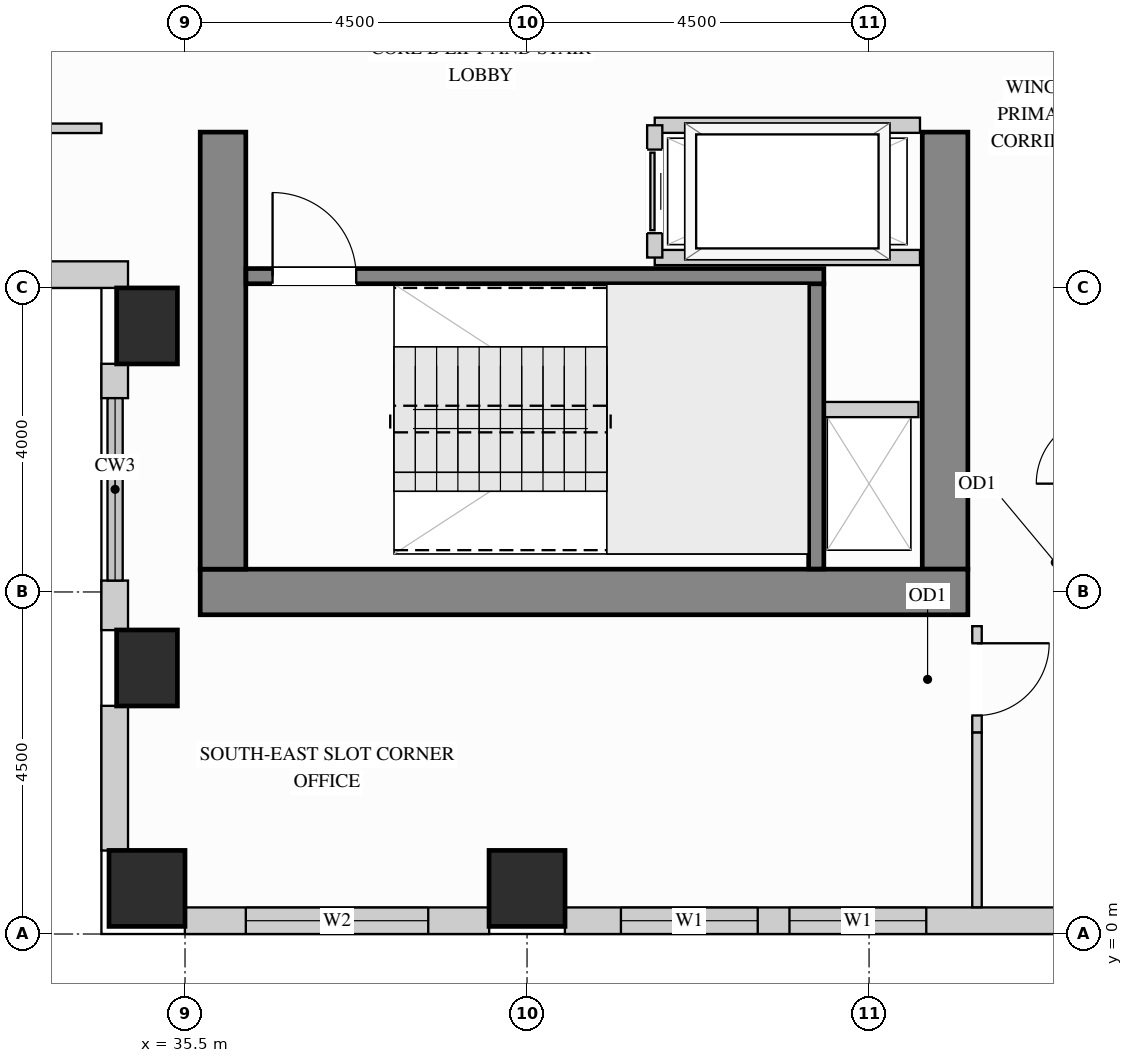
"""IFC4 building model, lengths in metres.
Left out: names, types, materials, properties, quantities, classifications, styles, units other than length and angle.
Written with IfcOpenShell. Run it as: python <this file> out.ifc"""

import sys

from ifc_helpers import new_model, si_unit, direction, frame, frame_2d, origin, origin_2d, place, context, subcontext, project, spatial, rectangle, extrude, source, transform, mapped, element, fill, save


model = new_model("IFC4")
c1 = context("Model", 3, precision=1e-05, world=origin(), true_north=direction((0.0, 1.0)))
c2 = subcontext(c1, "Body", "Model", "MODEL_VIEW")
j1 = project(units=[si_unit("LENGTHUNIT", "METRE"), si_unit("PLANEANGLEUNIT", "RADIAN")], contexts=[c1])
p1 = place(None, origin())
s1 = spatial("IfcSite", under=j1, at=p1, CompositionType="ELEMENT")
p2 = place(p1, origin())
s2 = spatial("IfcBuilding", under=s1, at=p2, CompositionType="ELEMENT")
p3 = place(p2, frame((0.0, 0.0, 204.3)))
s3 = spatial("IfcBuildingStorey", under=s2, at=p3, CompositionType="ELEMENT", Elevation=204.3)
m1 = source(origin(), c2, "Body", "SweptSolid", [
    extrude(rectangle(XDim=0.8, YDim=1.0, at=origin_2d()), origin(), (0.0, 0.0, 1.0), 3.32),
])
for number, where, z_axis, x_axis in (
    (1, (35.0, 3.5, 0.0), (0.0, 0.0, 1.0), (1.0, 0.0, 0.0)),
    (2, (35.0, 8.0, 0.0), (0.0, 0.0, 1.0), (1.0, 0.0, 0.0)),
):
    element("IfcColumn", number, at=place(p3, frame(where, z_axis=z_axis, x_axis=x_axis)), inside=s3, PredefinedType="COLUMN", context=c2, shape_type="MappedRepresentation", body=[
        mapped(m1, transform((0.0, 0.0, 0.0), x_axis=(1.0, 0.0, 0.0), y_axis=(0.0, 1.0, 0.0), z_axis=(0.0, 0.0, 1.0))),
    ])
m2 = source(origin(), c2, "Body", "SweptSolid", [
    extrude(rectangle(XDim=1.0, YDim=1.0, at=origin_2d()), origin(), (0.0, 0.0, 1.0), 3.32),
])
for number, where, z_axis, x_axis in (
    (3, (35.0, 0.6, 0.0), (0.0, 0.0, 1.0), (1.0, 0.0, 0.0)),
    (4, (40.0, 0.6, 0.0), (0.0, 0.0, 1.0), (1.0, 0.0, 0.0)),
):
    element("IfcColumn", number, at=place(p3, frame(where, z_axis=z_axis, x_axis=x_axis)), inside=s3, PredefinedType="COLUMN", context=c2, shape_type="MappedRepresentation", body=[
        mapped(m2, transform((0.0, 0.0, 0.0), x_axis=(1.0, 0.0, 0.0), y_axis=(0.0, 1.0, 0.0), z_axis=(0.0, 0.0, 1.0))),
    ])
m3 = source(origin(), c2, "Body", "SweptSolid", [
    extrude(rectangle(XDim=5.75, YDim=0.6, at=frame_2d((2.875, 0.0))), origin(), (0.0, 0.0, 1.0), 3.32),
])
p4 = place(p3, frame((45.5, 4.8, 0.0), z_axis=(0.0, 0.0, 1.0), x_axis=(0.0, 1.0, 0.0)))
e5 = element("IfcWall", 5, at=p4, inside=s3, PredefinedType="SHEAR", context=c2, shape_type="MappedRepresentation", body=[
    mapped(m3, transform((0.0, 0.0, 0.0), x_axis=(1.0, 0.0, 0.0), y_axis=(0.0, 1.0, 0.0), z_axis=(0.0, 0.0, 1.0))),
])
m4 = source(origin(), c2, "Body", "SweptSolid", [
    extrude(rectangle(XDim=10.1, YDim=0.6, at=frame_2d((5.05, 0.0))), origin(), (0.0, 0.0, 1.0), 3.32),
])
p5 = place(p3, frame((35.7, 4.5, 0.0), z_axis=(0.0, 0.0, 1.0), x_axis=(1.0, 0.0, 0.0)))
e6 = element("IfcWall", 6, at=p5, inside=s3, PredefinedType="SHEAR", context=c2, shape_type="MappedRepresentation", body=[
    mapped(m4, transform((0.0, 0.0, 0.0), x_axis=(1.0, 0.0, 0.0), y_axis=(0.0, 1.0, 0.0), z_axis=(0.0, 0.0, 1.0))),
])
p6 = place(p3, frame((36.0, 4.8, 0.0), z_axis=(0.0, 0.0, 1.0), x_axis=(0.0, 1.0, 0.0)))
e7 = element("IfcWall", 7, at=p6, inside=s3, PredefinedType="SHEAR", context=c2, shape_type="MappedRepresentation", body=[
    mapped(m3, transform((0.0, 0.0, 0.0), x_axis=(1.0, 0.0, 0.0), y_axis=(0.0, 1.0, 0.0), z_axis=(0.0, 0.0, 1.0))),
])
p7 = place(p3, frame((30.898, 8.675, 0.0), z_axis=(0.0, 0.0, 1.0), x_axis=(1.0, 0.0, 0.0)))
e8 = element("IfcWall", 8, at=p7, inside=s3, PredefinedType="SOLIDWALL", context=c2, shape_type="SweptSolid", body=[
    extrude(rectangle(XDim=3.852, YDim=0.35, at=frame_2d((1.926, 0.0))), origin(), (0.0, 0.0, 1.0), 3.305),
])
p8 = place(p7, frame((1.176, 0.0, 0.78)))
e9 = element("IfcOpeningElement", 9, at=p8, cuts=e8, PredefinedType="OPENING", context=c2, shape_type="SweptSolid", body=[
    extrude(rectangle(XDim=1.5, YDim=2.0, at=frame_2d((0.75, 1.0))), frame((0.0, 0.185, 0.0), z_axis=(0.0, -1.0, 0.0), x_axis=(1.0, 0.0, 0.0)), (0.0, 0.0, 1.0), 0.37),
])
m5 = source(origin(), c2, "Body", "SweptSolid", [
    extrude(rectangle(XDim=0.452, YDim=0.35, at=frame_2d((0.226, 0.0))), origin(), (0.0, 0.0, 1.0), 2.532),
])
p9 = place(p3, frame((34.575, 7.502, 0.0), z_axis=(0.0, 0.0, 1.0), x_axis=(0.0, -1.0, 0.0)))
e10 = element("IfcWall", 10, at=p9, inside=s3, PredefinedType="SOLIDWALL", context=c2, shape_type="MappedRepresentation", body=[
    mapped(m5, transform((0.0, 0.0, 0.0), x_axis=(1.0, 0.0, 0.0), y_axis=(0.0, 1.0, 0.0), z_axis=(0.0, 0.0, 1.0))),
])
m6 = source(origin(), c2, "Body", "SweptSolid", [
    extrude(rectangle(XDim=0.652, YDim=0.35, at=frame_2d((0.326, 0.0))), origin(), (0.0, 0.0, 1.0), 2.532),
])
p10 = place(p3, frame((34.575, 4.65, 0.0), z_axis=(0.0, 0.0, 1.0), x_axis=(0.0, -1.0, 0.0)))
e11 = element("IfcWall", 11, at=p10, inside=s3, PredefinedType="SOLIDWALL", context=c2, shape_type="MappedRepresentation", body=[
    mapped(m6, transform((0.0, 0.0, 0.0), x_axis=(1.0, 0.0, 0.0), y_axis=(0.0, 1.0, 0.0), z_axis=(0.0, 0.0, 1.0))),
])
m7 = source(origin(), c2, "Body", "SweptSolid", [
    extrude(rectangle(XDim=1.904, YDim=0.35, at=frame_2d((0.952, 0.0))), origin(), (0.0, 0.0, 1.0), 2.532),
])
p11 = place(p3, frame((34.575, 3.002, 0.0), z_axis=(0.0, 0.0, 1.0), x_axis=(0.0, -1.0, 0.0)))
e12 = element("IfcWall", 12, at=p11, inside=s3, PredefinedType="SOLIDWALL", context=c2, shape_type="MappedRepresentation", body=[
    mapped(m7, transform((0.0, 0.0, 0.0), x_axis=(1.0, 0.0, 0.0), y_axis=(0.0, 1.0, 0.0), z_axis=(0.0, 0.0, 1.0))),
])
p12 = place(p3, frame((35.498, 0.175, 0.0), z_axis=(0.0, 0.0, 1.0), x_axis=(1.0, 0.0, 0.0)))
e13 = element("IfcWall", 13, at=p12, inside=s3, PredefinedType="SOLIDWALL", context=c2, shape_type="SweptSolid", body=[
    extrude(rectangle(XDim=4.004, YDim=0.35, at=frame_2d((2.002, 0.0))), origin(), (0.0, 0.0, 1.0), 2.532),
])
p13 = place(p12, frame((0.802, 0.0, 0.78)))
e14 = element("IfcOpeningElement", 14, at=p13, cuts=e13, PredefinedType="OPENING", context=c2, shape_type="SweptSolid", body=[
    extrude(rectangle(XDim=2.4, YDim=1.572, at=frame_2d((1.2, 0.786))), frame((0.0, 0.185, 0.0), z_axis=(0.0, -1.0, 0.0), x_axis=(1.0, 0.0, 0.0)), (0.0, 0.0, 1.0), 0.37),
])
p14 = place(p3, frame((40.498, 0.175, 0.0), z_axis=(0.0, 0.0, 1.0), x_axis=(1.0, 0.0, 0.0)))
e15 = element("IfcWall", 15, at=p14, inside=s3, PredefinedType="SOLIDWALL", context=c2, shape_type="SweptSolid", body=[
    extrude(rectangle(XDim=6.604, YDim=0.35, at=frame_2d((3.302, 0.0))), origin(), (0.0, 0.0, 1.0), 2.532),
])
p15 = place(p14, frame((0.737, 0.0, 0.78)))
e16 = element("IfcOpeningElement", 16, at=p15, cuts=e15, PredefinedType="OPENING", context=c2, shape_type="SweptSolid", body=[
    extrude(rectangle(XDim=1.8, YDim=1.572, at=frame_2d((0.9, 0.786))), frame((0.0, 0.185, 0.0), z_axis=(0.0, -1.0, 0.0), x_axis=(1.0, 0.0, 0.0)), (0.0, 0.0, 1.0), 0.37),
])
p16 = place(p14, frame((2.955, 0.0, 0.78)))
e17 = element("IfcOpeningElement", 17, at=p16, cuts=e15, PredefinedType="OPENING", context=c2, shape_type="SweptSolid", body=[
    extrude(rectangle(XDim=1.8, YDim=1.572, at=frame_2d((0.9, 0.786))), frame((0.0, 0.185, 0.0), z_axis=(0.0, -1.0, 0.0), x_axis=(1.0, 0.0, 0.0)), (0.0, 0.0, 1.0), 0.37),
])
p17 = place(p3, frame((45.92, 2.65, 0.0), z_axis=(0.0, 0.0, 1.0), x_axis=(0.0, 1.0, 0.0)))
e18 = element("IfcWall", 18, at=p17, inside=s3, PredefinedType="PARTITIONING", context=c2, shape_type="SweptSolid", body=[
    extrude(rectangle(XDim=1.4, YDim=0.125, at=frame_2d((0.7, 0.0))), origin(), (0.0, 0.0, 1.0), 3.305),
])
p18 = place(p17, frame((0.225, 0.0, 0.0)))
e19 = element("IfcOpeningElement", 19, at=p18, cuts=e18, PredefinedType="OPENING", context=c2, shape_type="SweptSolid", body=[
    extrude(rectangle(XDim=0.95, YDim=2.15, at=frame_2d((0.475, 1.075))), frame((0.0, 0.073, 0.0), z_axis=(0.0, -1.0, 0.0), x_axis=(1.0, 0.0, 0.0)), (0.0, 0.0, 1.0), 0.145),
])
m8 = source(origin(), c2, "Body", "SweptSolid", [
    extrude(rectangle(XDim=2.298, YDim=0.125, at=frame_2d((1.149, 0.0))), origin(), (0.0, 0.0, 1.0), 3.305),
])
p19 = place(p3, frame((45.92, 0.352, 0.0), z_axis=(0.0, 0.0, 1.0), x_axis=(0.0, 1.0, 0.0)))
e20 = element("IfcWall", 20, at=p19, inside=s3, PredefinedType="PARTITIONING", context=c2, shape_type="MappedRepresentation", body=[
    mapped(m8, transform((0.0, 0.0, 0.0), x_axis=(1.0, 0.0, 0.0), y_axis=(0.0, 1.0, 0.0), z_axis=(0.0, 0.0, 1.0))),
])
p20 = place(p3, frame((29.85, 10.6, 0.0), z_axis=(0.0, 0.0, 1.0), x_axis=(1.0, 0.0, 0.0)))
e21 = element("IfcWall", 21, at=p20, inside=s3, PredefinedType="PARTITIONING", context=c2, shape_type="SweptSolid", body=[
    extrude(rectangle(XDim=4.55, YDim=0.125, at=frame_2d((2.275, 0.0))), origin(), (0.0, 0.0, 1.0), 3.305),
])
p21 = place(p20, frame((1.8, 0.0, 0.0)))
e22 = element("IfcOpeningElement", 22, at=p21, cuts=e21, PredefinedType="OPENING", context=c2, shape_type="SweptSolid", body=[
    extrude(rectangle(XDim=0.95, YDim=2.15, at=frame_2d((0.475, 1.075))), frame((0.0, 0.073, 0.0), z_axis=(0.0, -1.0, 0.0), x_axis=(1.0, 0.0, 0.0)), (0.0, 0.0, 1.0), 0.145),
])
m9 = source(origin(), c2, "Body", "SweptSolid", [
    extrude(rectangle(XDim=1.3, YDim=0.2, at=frame_2d((0.65, 0.0))), origin(), (0.0, 0.0, 1.0), 3.305),
])
p22 = place(p3, frame((43.85, 6.9, 0.0), z_axis=(0.0, 0.0, 1.0), x_axis=(1.0, 0.0, 0.0)))
e23 = element("IfcWall", 23, at=p22, inside=s3, PredefinedType="PARTITIONING", context=c2, shape_type="MappedRepresentation", body=[
    mapped(m9, transform((0.0, 0.0, 0.0), x_axis=(1.0, 0.0, 0.0), y_axis=(0.0, 1.0, 0.0), z_axis=(0.0, 0.0, 1.0))),
])
m10 = source(origin(), c2, "Body", "SweptSolid", [
    extrude(rectangle(XDim=3.49, YDim=0.2, at=frame_2d((1.745, 0.0))), origin(), (0.0, 0.0, 1.0), 3.305),
])
for number, where, z_axis, x_axis in (
    (24, (41.68, 10.64, 0.0), (0.0, 0.0, 1.0), (1.0, 0.0, 0.0)),
    (25, (41.68, 8.9, 0.0), (0.0, 0.0, 1.0), (1.0, 0.0, 0.0)),
):
    element("IfcWall", number, at=place(p3, frame(where, z_axis=z_axis, x_axis=x_axis)), inside=s3, PredefinedType="PARTITIONING", context=c2, shape_type="MappedRepresentation", body=[
        mapped(m10, transform((0.0, 0.0, 0.0), x_axis=(1.0, 0.0, 0.0), y_axis=(0.0, 1.0, 0.0), z_axis=(0.0, 0.0, 1.0))),
    ])
p23 = place(p3, frame((41.68, 8.9, 0.0), z_axis=(0.0, 0.0, 1.0), x_axis=(0.0, 1.0, 0.0)))
e26 = element("IfcWall", 26, at=p23, inside=s3, PredefinedType="PARTITIONING", context=c2, shape_type="SweptSolid", body=[
    extrude(rectangle(XDim=1.74, YDim=0.2, at=frame_2d((0.87, 0.0))), origin(), (0.0, 0.0, 1.0), 3.305),
])
p24 = place(p23, frame((0.32, 0.0, 0.0)))
e27 = element("IfcOpeningElement", 27, at=p24, cuts=e26, PredefinedType="OPENING", context=c2, shape_type="SweptSolid", body=[
    extrude(rectangle(XDim=1.1, YDim=2.2, at=frame_2d((0.55, 1.1))), frame((0.0, 0.11, 0.0), z_axis=(0.0, -1.0, 0.0), x_axis=(1.0, 0.0, 0.0)), (0.0, 0.0, 1.0), 0.22),
])
m11 = source(origin(), c2, "Body", "SweptSolid", [
    extrude(rectangle(XDim=3.753, YDim=0.2, at=frame_2d((1.876, 0.0))), origin(), (0.0, 0.0, 1.0), 3.32),
])
p25 = place(p3, frame((43.805, 4.802, 0.0), z_axis=(0.0, 0.0, 1.0), x_axis=(0.0, 1.0, 0.0)))
e28 = element("IfcWall", 28, at=p25, inside=s3, PredefinedType="SHEAR", context=c2, shape_type="MappedRepresentation", body=[
    mapped(m11, transform((0.0, 0.0, 0.0), x_axis=(1.0, 0.0, 0.0), y_axis=(0.0, 1.0, 0.0), z_axis=(0.0, 0.0, 1.0))),
])
p26 = place(p3, frame((36.302, 8.655, 0.0), z_axis=(0.0, 0.0, 1.0), x_axis=(1.0, 0.0, 0.0)))
e29 = element("IfcWall", 29, at=p26, inside=s3, PredefinedType="SHEAR", context=c2, shape_type="SweptSolid", body=[
    extrude(rectangle(XDim=7.603, YDim=0.2, at=frame_2d((3.802, 0.0))), origin(), (0.0, 0.0, 1.0), 3.32),
])
p27 = place(p26, frame((0.35, 0.0, 0.0)))
e30 = element("IfcOpeningElement", 30, at=p27, cuts=e29, PredefinedType="OPENING", context=c2, shape_type="SweptSolid", body=[
    extrude(rectangle(XDim=1.1, YDim=2.15, at=frame_2d((0.55, 1.075))), frame((0.0, 0.11, 0.0), z_axis=(0.0, -1.0, 0.0), x_axis=(1.0, 0.0, 0.0)), (0.0, 0.0, 1.0), 0.22),
])
m12 = source(origin(), c2, "Body", "SweptSolid", [
    extrude(rectangle(XDim=1.1, YDim=2.2, at=frame_2d((0.55, 1.1))), frame((0.0, 0.025, 0.0), z_axis=(0.0, -1.0, 0.0), x_axis=(1.0, 0.0, 0.0)), (0.0, 0.0, 1.0), 0.05),
])
p28 = place(p24, origin())
e31 = element("IfcDoor", 31, at=p28, inside=s3, OperationType="SLIDING_TO_LEFT", PredefinedType="DOOR", context=c2, shape_type="MappedRepresentation", body=[
    mapped(m12, transform((0.0, 0.0, 0.0), x_axis=(1.0, 0.0, 0.0), y_axis=(0.0, 1.0, 0.0), z_axis=(0.0, 0.0, 1.0))),
])
fill(e27, e31)
m13 = source(origin(), c2, "Body", "SweptSolid", [
    extrude(rectangle(XDim=0.95, YDim=2.15, at=frame_2d((0.475, 1.075))), frame((0.0, 0.025, 0.0), z_axis=(0.0, -1.0, 0.0), x_axis=(1.0, 0.0, 0.0)), (0.0, 0.0, 1.0), 0.05),
])
p29 = place(p18, origin())
e32 = element("IfcDoor", 32, at=p29, inside=s3, OperationType="SINGLE_SWING_RIGHT", PredefinedType="DOOR", context=c2, shape_type="MappedRepresentation", body=[
    mapped(m13, transform((0.0, 0.0, 0.0), x_axis=(1.0, 0.0, 0.0), y_axis=(0.0, 1.0, 0.0), z_axis=(0.0, 0.0, 1.0))),
])
fill(e19, e32)
m14 = source(origin(), c2, "Body", "SweptSolid", [
    extrude(rectangle(XDim=1.1, YDim=2.15, at=frame_2d((0.55, 1.075))), frame((0.0, 0.025, 0.0), z_axis=(0.0, -1.0, 0.0), x_axis=(1.0, 0.0, 0.0)), (0.0, 0.0, 1.0), 0.05),
])
p30 = place(p27, origin())
e33 = element("IfcDoor", 33, at=p30, inside=s3, OperationType="SINGLE_SWING_LEFT", PredefinedType="DOOR", context=c2, shape_type="MappedRepresentation", body=[
    mapped(m14, transform((0.0, 0.0, 0.0), x_axis=(1.0, 0.0, 0.0), y_axis=(0.0, 1.0, 0.0), z_axis=(0.0, 0.0, 1.0))),
])
fill(e30, e33)
m15 = source(origin(), c2, "Body", "SweptSolid", [
    extrude(rectangle(XDim=1.8, YDim=1.572, at=frame_2d((0.9, 0.786))), frame((0.0, 0.03, 0.0), z_axis=(0.0, -1.0, 0.0), x_axis=(1.0, 0.0, 0.0)), (0.0, 0.0, 1.0), 0.06),
])
p31 = place(p15, origin())
e34 = element("IfcWindow", 34, at=p31, inside=s3, PartitioningType="SINGLE_PANEL", PredefinedType="WINDOW", context=c2, shape_type="MappedRepresentation", body=[
    mapped(m15, transform((0.0, 0.0, 0.0), x_axis=(1.0, 0.0, 0.0), y_axis=(0.0, 1.0, 0.0), z_axis=(0.0, 0.0, 1.0))),
])
fill(e16, e34)
p32 = place(p16, origin())
e35 = element("IfcWindow", 35, at=p32, inside=s3, PartitioningType="SINGLE_PANEL", PredefinedType="WINDOW", context=c2, shape_type="MappedRepresentation", body=[
    mapped(m15, transform((0.0, 0.0, 0.0), x_axis=(1.0, 0.0, 0.0), y_axis=(0.0, 1.0, 0.0), z_axis=(0.0, 0.0, 1.0))),
])
fill(e17, e35)
m16 = source(origin(), c2, "Body", "SweptSolid", [
    extrude(rectangle(XDim=2.4, YDim=1.572, at=frame_2d((1.2, 0.786))), frame((0.0, 0.03, 0.0), z_axis=(0.0, -1.0, 0.0), x_axis=(1.0, 0.0, 0.0)), (0.0, 0.0, 1.0), 0.06),
])
p33 = place(p13, origin())
e36 = element("IfcWindow", 36, at=p33, inside=s3, PartitioningType="SINGLE_PANEL", PredefinedType="WINDOW", context=c2, shape_type="MappedRepresentation", body=[
    mapped(m16, transform((0.0, 0.0, 0.0), x_axis=(1.0, 0.0, 0.0), y_axis=(0.0, 1.0, 0.0), z_axis=(0.0, 0.0, 1.0))),
])
fill(e14, e36)
save(model, sys.argv[1])
